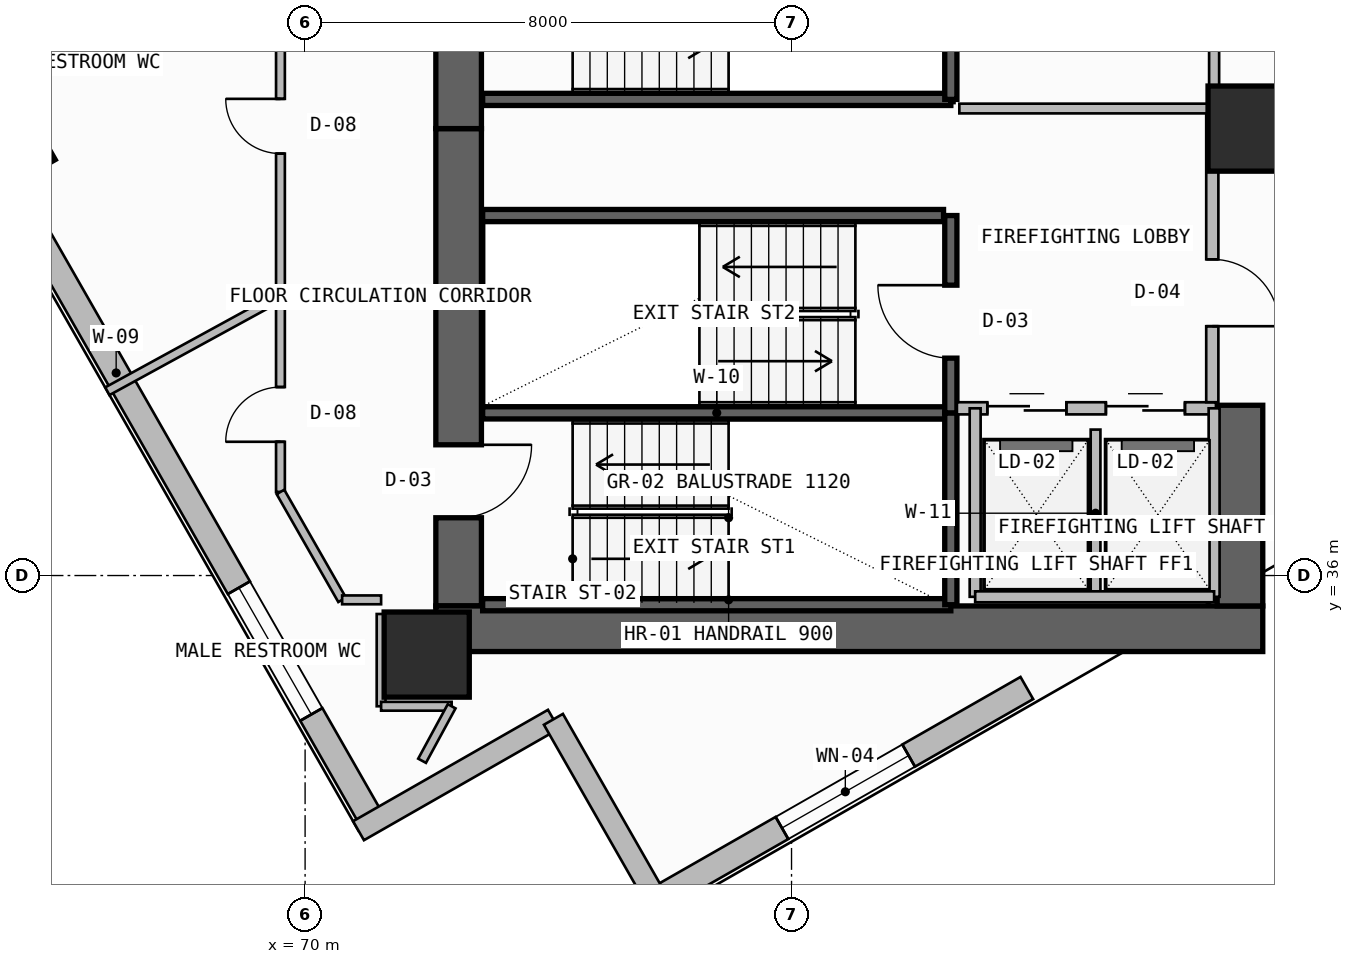
"""IFC4 building model, lengths in metres.
Left out: names, types, materials, properties, quantities, classifications, styles, units other than length and angle.
Written with IfcOpenShell. Run it as: python <this file> out.ifc"""

import sys

from ifc_helpers import new_model, si_unit, direction, frame, frame_2d, origin, origin_2d, place, context, subcontext, project, spatial, rectangle, extrude, element, fill, save


model = new_model("IFC4")
c1 = context("Model", 3, precision=1e-05, world=origin(), true_north=direction((0.0, 1.0)))
c2 = subcontext(c1, "Body", "Model", "MODEL_VIEW")
j1 = project(units=[si_unit("LENGTHUNIT", "METRE"), si_unit("PLANEANGLEUNIT", "RADIAN")], contexts=[c1])
p1 = place(None, origin())
s1 = spatial("IfcSite", under=j1, at=p1, CompositionType="ELEMENT")
p2 = place(p1, origin())
s2 = spatial("IfcBuilding", under=s1, at=p2, CompositionType="ELEMENT")
p3 = place(p2, frame((0.0, 0.0, 222.02)))
s3 = spatial("IfcBuildingStorey", under=s2, at=p3, CompositionType="ELEMENT", Elevation=222.02)
p4 = place(p3, frame((72.525, 35.5, -0.26), z_axis=(0.0, 0.0, 1.0), x_axis=(0.0, 1.0, 0.0)))
e1 = element("IfcWall", 1, at=p4, inside=s3, PredefinedType="SHEAR", context=c2, shape_type="SweptSolid", body=[
    extrude(rectangle(XDim=7.85, YDim=0.75, at=frame_2d((3.925, 0.0))), origin(), (0.0, 0.0, 1.0), 3.52),
])
p5 = place(p4, frame((1.45, 0.0, 0.26)))
e2 = element("IfcOpeningElement", 2, at=p5, cuts=e1, PredefinedType="OPENING", context=c2, shape_type="SweptSolid", body=[
    extrude(rectangle(XDim=1.2, YDim=2.2, at=frame_2d((0.6, 1.1))), frame((0.0, 0.385, 0.0), z_axis=(0.0, -1.0, 0.0), x_axis=(1.0, 0.0, 0.0)), (0.0, 0.0, 1.0), 0.77),
])
p6 = place(p3, frame((72.15, 35.125, -0.26), z_axis=(0.0, 0.0, 1.0), x_axis=(1.0, 0.0, 0.0)))
e3 = element("IfcWall", 3, at=p6, inside=s3, PredefinedType="SHEAR", context=c2, shape_type="SweptSolid", body=[
    extrude(rectangle(XDim=13.6, YDim=0.75, at=frame_2d((6.8, 0.0))), origin(), (0.0, 0.0, 1.0), 3.52),
])
p7 = place(p3, frame((85.375, 35.5, -0.26), z_axis=(0.0, 0.0, 1.0), x_axis=(0.0, 1.0, 0.0)))
e4 = element("IfcWall", 4, at=p7, inside=s3, PredefinedType="SHEAR", context=c2, shape_type="SweptSolid", body=[
    extrude(rectangle(XDim=3.3, YDim=0.75, at=frame_2d((1.65, 0.0))), origin(), (0.0, 0.0, 1.0), 3.52),
])
p8 = place(p3, frame((72.525, 43.35, -0.26), z_axis=(0.0, 0.0, 1.0), x_axis=(0.0, 1.0, 0.0)))
e5 = element("IfcWall", 5, at=p8, inside=s3, PredefinedType="SHEAR", context=c2, shape_type="SweptSolid", body=[
    extrude(rectangle(XDim=12.7, YDim=0.75, at=frame_2d((6.35, 0.0))), origin(), (0.0, 0.0, 1.0), 3.52),
])
p9 = place(p8, frame((1.35, 0.0, 0.26)))
e6 = element("IfcOpeningElement", 6, at=p9, cuts=e5, PredefinedType="OPENING", context=c2, shape_type="SweptSolid", body=[
    extrude(rectangle(XDim=1.2, YDim=2.2, at=frame_2d((0.6, 1.1))), frame((0.0, 0.385, 0.0), z_axis=(0.0, -1.0, 0.0), x_axis=(1.0, 0.0, 0.0)), (0.0, 0.0, 1.0), 0.77),
])
for number, where, z_axis, x_axis in (
    (7, (72.0, 34.7, 0.0), (0.0, 0.0, 1.0), (1.0, 0.0, 0.0)),
    (8, (85.55, 43.35, 0.0), (0.0, 0.0, 1.0), (1.0, 0.0, 0.0)),
):
    element("IfcColumn", number, at=place(p3, frame(where, z_axis=z_axis, x_axis=x_axis)), inside=s3, PredefinedType="COLUMN", context=c2, shape_type="SweptSolid", body=[
        extrude(rectangle(XDim=1.4, YDim=1.4, at=origin_2d()), origin(), (0.0, 0.0, 1.0), 3.52),
    ])
p10 = place(p3, frame((65.173, 43.035, 0.0), z_axis=(0.0, 0.0, 1.0), x_axis=(-0.496216503675, 0.868198814489, 0.0)))
e9 = element("IfcColumn", 9, at=p10, inside=s3, PredefinedType="COLUMN", context=c2, shape_type="SweptSolid", body=[
    extrude(rectangle(XDim=1.05, YDim=1.05, at=origin_2d()), origin(), (0.0, 0.0, 1.0), 3.52),
])
p11 = place(p3, frame((75.779, 30.669, 0.0), z_axis=(0.0, 0.0, 1.0), x_axis=(0.868213158215, 0.496191406519, 0.0)))
e10 = element("IfcWall", 10, at=p11, inside=s3, PredefinedType="SOLIDWALL", context=c2, shape_type="SweptSolid", body=[
    extrude(rectangle(XDim=7.015, YDim=0.42, at=frame_2d((3.508, 0.0))), origin(), (0.0, 0.0, 1.0), 3.26),
])
p12 = place(p11, frame((2.377, 0.0, 1.1)))
e11 = element("IfcOpeningElement", 11, at=p12, cuts=e10, PredefinedType="OPENING", context=c2, shape_type="SweptSolid", body=[
    extrude(rectangle(XDim=2.4, YDim=1.2, at=frame_2d((1.2, 0.6))), frame((0.0, 0.22, 0.0), z_axis=(0.0, -1.0, 0.0), x_axis=(1.0, 0.0, 0.0)), (0.0, 0.0, 1.0), 0.44),
])
p13 = place(p3, frame((64.874, 42.864, 0.0), z_axis=(0.0, 0.0, 1.0), x_axis=(0.49622043329, -0.868196568517, 0.0)))
e12 = element("IfcWall", 12, at=p13, inside=s3, PredefinedType="SOLIDWALL", context=c2, shape_type="SweptSolid", body=[
    extrude(rectangle(XDim=12.582, YDim=0.42, at=frame_2d((6.291, 0.0))), origin(), (0.0, 0.0, 1.0), 2.645),
])
p14 = place(p13, frame((8.136, 0.0, 1.1)))
e13 = element("IfcOpeningElement", 13, at=p14, cuts=e12, PredefinedType="OPENING", context=c2, shape_type="SweptSolid", body=[
    extrude(rectangle(XDim=2.4, YDim=1.2, at=frame_2d((1.2, 0.6))), frame((0.0, 0.22, 0.0), z_axis=(0.0, -1.0, 0.0), x_axis=(1.0, 0.0, 0.0)), (0.0, 0.0, 1.0), 0.44),
])
for number, where, z_axis, x_axis in (
    (14, (70.878, 31.803, 0.0), (0.0, 0.0, 1.0), (0.868, 0.496, 0.0)),
    (15, (74.084, 33.635, 0.0), (0.0, 0.0, 1.0), (0.496, -0.868, 0.0)),
):
    element("IfcWall", number, at=place(p3, frame(where, z_axis=z_axis, x_axis=x_axis)), inside=s3, PredefinedType="SOLIDWALL", context=c2, shape_type="SweptSolid", body=[
        extrude(rectangle(XDim=3.692, YDim=0.36, at=frame_2d((1.846, 0.0))), origin(), (0.0, 0.0, 1.0), 3.26),
    ])
for number, where, z_axis, x_axis in (
    (16, (72.92, 35.52, -0.26), (0.0, 0.0, 1.0), (1.0, 0.0, 0.0)),
    (17, (72.92, 38.675, -0.26), (0.0, 0.0, 1.0), (1.0, 0.0, 0.0)),
):
    element("IfcWall", number, at=place(p3, frame(where, z_axis=z_axis, x_axis=x_axis)), inside=s3, PredefinedType="SOLIDWALL", context=c2, shape_type="SweptSolid", body=[
        extrude(rectangle(XDim=7.7, YDim=0.2, at=frame_2d((3.85, 0.0))), origin(), (0.0, 0.0, 1.0), 3.52),
    ])
p15 = place(p3, frame((80.62, 35.52, -0.26), z_axis=(0.0, 0.0, 1.0), x_axis=(0.0, 1.0, 0.0)))
e18 = element("IfcWall", 18, at=p15, inside=s3, PredefinedType="SOLIDWALL", context=c2, shape_type="SweptSolid", body=[
    extrude(rectangle(XDim=3.155, YDim=0.2, at=frame_2d((1.578, 0.0))), origin(), (0.0, 0.0, 1.0), 3.52),
])
p16 = place(p3, frame((80.62, 38.675, -0.26), z_axis=(0.0, 0.0, 1.0), x_axis=(0.0, 1.0, 0.0)))
e19 = element("IfcWall", 19, at=p16, inside=s3, PredefinedType="SOLIDWALL", context=c2, shape_type="SweptSolid", body=[
    extrude(rectangle(XDim=3.245, YDim=0.2, at=frame_2d((1.623, 0.0))), origin(), (0.0, 0.0, 1.0), 3.52),
])
p17 = place(p16, frame((0.9, 0.0, 0.26)))
e20 = element("IfcOpeningElement", 20, at=p17, cuts=e19, PredefinedType="OPENING", context=c2, shape_type="SweptSolid", body=[
    extrude(rectangle(XDim=1.2, YDim=2.2, at=frame_2d((0.6, 1.1))), frame((0.0, 0.11, 0.0), z_axis=(0.0, -1.0, 0.0), x_axis=(1.0, 0.0, 0.0)), (0.0, 0.0, 1.0), 0.22),
])
p18 = place(p3, frame((80.72, 38.75, 0.0), z_axis=(0.0, 0.0, 1.0), x_axis=(1.0, 0.0, 0.0)))
e21 = element("IfcWall", 21, at=p18, inside=s3, PredefinedType="SOLIDWALL", context=c2, shape_type="SweptSolid", body=[
    extrude(rectangle(XDim=4.26, YDim=0.2, at=frame_2d((2.13, 0.0))), origin(), (0.0, 0.0, 1.0), 3.26),
])
p19 = place(p18, frame((0.5, 0.0, 0.0)))
e22 = element("IfcOpeningElement", 22, at=p19, cuts=e21, PredefinedType="OPENING", context=c2, shape_type="SweptSolid", body=[
    extrude(rectangle(XDim=1.3, YDim=2.3, at=frame_2d((0.65, 1.15))), frame((0.0, 0.11, 0.0), z_axis=(0.0, -1.0, 0.0), x_axis=(1.0, 0.0, 0.0)), (0.0, 0.0, 1.0), 0.22),
])
p20 = place(p18, frame((2.45, 0.0, 0.0)))
e23 = element("IfcOpeningElement", 23, at=p20, cuts=e21, PredefinedType="OPENING", context=c2, shape_type="SweptSolid", body=[
    extrude(rectangle(XDim=1.3, YDim=2.3, at=frame_2d((0.65, 1.15))), frame((0.0, 0.11, 0.0), z_axis=(0.0, -1.0, 0.0), x_axis=(1.0, 0.0, 0.0)), (0.0, 0.0, 1.0), 0.22),
])
p21 = place(p3, frame((83.0, 35.65, 0.0), z_axis=(0.0, 0.0, 1.0), x_axis=(0.0, 1.0, 0.0)))
e24 = element("IfcWall", 24, at=p21, inside=s3, PredefinedType="PLUMBINGWALL", context=c2, shape_type="SweptSolid", body=[
    extrude(rectangle(XDim=2.75, YDim=0.16, at=frame_2d((1.375, 0.0))), origin(), (0.0, 0.0, 1.0), 3.26),
])
for number, where, z_axis, x_axis in (
    (25, (84.95, 35.65, 0.0), (0.0, 0.0, 1.0), (0.0, 1.0, 0.0)),
    (26, (81.02, 35.65, 0.0), (0.0, 0.0, 1.0), (0.0, 1.0, 0.0)),
):
    element("IfcWall", number, at=place(p3, frame(where, z_axis=z_axis, x_axis=x_axis)), inside=s3, PredefinedType="SOLIDWALL", context=c2, shape_type="SweptSolid", body=[
        extrude(rectangle(XDim=3.1, YDim=0.18, at=frame_2d((1.55, 0.0))), origin(), (0.0, 0.0, 1.0), 3.26),
    ])
p22 = place(p3, frame((81.02, 35.65, 0.0), z_axis=(0.0, 0.0, 1.0), x_axis=(1.0, 0.0, 0.0)))
e27 = element("IfcWall", 27, at=p22, inside=s3, PredefinedType="SOLIDWALL", context=c2, shape_type="SweptSolid", body=[
    extrude(rectangle(XDim=3.93, YDim=0.18, at=frame_2d((1.965, 0.0))), origin(), (0.0, 0.0, 1.0), 3.26),
])
p23 = place(p3, frame((84.92, 38.85, 0.0), z_axis=(0.0, 0.0, 1.0), x_axis=(0.0, 1.0, 0.0)))
e28 = element("IfcWall", 28, at=p23, inside=s3, PredefinedType="SOLIDWALL", context=c2, shape_type="SweptSolid", body=[
    extrude(rectangle(XDim=4.83, YDim=0.2, at=frame_2d((2.415, 0.0))), origin(), (0.0, 0.0, 1.0), 3.26),
])
p24 = place(p23, frame((1.25, 0.0, 0.0)))
e29 = element("IfcOpeningElement", 29, at=p24, cuts=e28, PredefinedType="OPENING", context=c2, shape_type="SweptSolid", body=[
    extrude(rectangle(XDim=1.1, YDim=2.2, at=frame_2d((0.55, 1.1))), frame((0.0, 0.11, 0.0), z_axis=(0.0, -1.0, 0.0), x_axis=(1.0, 0.0, 0.0)), (0.0, 0.0, 1.0), 0.22),
])
p25 = place(p3, frame((72.92, 41.92, -0.26), z_axis=(0.0, 0.0, 1.0), x_axis=(1.0, 0.0, 0.0)))
e30 = element("IfcWall", 30, at=p25, inside=s3, PredefinedType="SOLIDWALL", context=c2, shape_type="SweptSolid", body=[
    extrude(rectangle(XDim=7.58, YDim=0.2, at=frame_2d((3.79, 0.0))), origin(), (0.0, 0.0, 1.0), 3.52),
])
p26 = place(p3, frame((72.92, 43.83, -0.26), z_axis=(0.0, 0.0, 1.0), x_axis=(1.0, 0.0, 0.0)))
e31 = element("IfcWall", 31, at=p26, inside=s3, PredefinedType="SOLIDWALL", context=c2, shape_type="SweptSolid", body=[
    extrude(rectangle(XDim=7.7, YDim=0.2, at=frame_2d((3.85, 0.0))), origin(), (0.0, 0.0, 1.0), 3.52),
])
p27 = place(p3, frame((80.62, 43.83, -0.26), z_axis=(0.0, 0.0, 1.0), x_axis=(0.0, 1.0, 0.0)))
e32 = element("IfcWall", 32, at=p27, inside=s3, PredefinedType="SOLIDWALL", context=c2, shape_type="SweptSolid", body=[
    extrude(rectangle(XDim=3.24, YDim=0.2, at=frame_2d((1.62, 0.0))), origin(), (0.0, 0.0, 1.0), 3.52),
])
p28 = place(p3, frame((84.95, 43.68, 0.0), z_axis=(0.0, 0.0, 1.0), x_axis=(0.0, 1.0, 0.0)))
e33 = element("IfcWall", 33, at=p28, inside=s3, PredefinedType="PLUMBINGWALL", context=c2, shape_type="SweptSolid", body=[
    extrude(rectangle(XDim=1.9, YDim=0.165, at=frame_2d((0.95, 0.0))), origin(), (0.0, 0.0, 1.0), 3.26),
])
p29 = place(p3, frame((80.76, 43.68, 0.0), z_axis=(0.0, 0.0, 1.0), x_axis=(1.0, 0.0, 0.0)))
e34 = element("IfcWall", 34, at=p29, inside=s3, PredefinedType="PLUMBINGWALL", context=c2, shape_type="SweptSolid", body=[
    extrude(rectangle(XDim=4.19, YDim=0.16, at=frame_2d((2.095, 0.0))), origin(), (0.0, 0.0, 1.0), 3.26),
])
p30 = place(p3, frame((69.594, 46.222, 0.0), z_axis=(0.0, 0.0, 1.0), x_axis=(0.0, -1.0, 0.0)))
e35 = element("IfcWall", 35, at=p30, inside=s3, PredefinedType="PARTITIONING", context=c2, shape_type="SweptSolid", body=[
    extrude(rectangle(XDim=5.666, YDim=0.145, at=frame_2d((2.833, 0.0))), origin(), (0.0, 0.0, 1.0), 3.26),
])
p31 = place(p30, frame((2.383, 0.0, 0.0)))
e36 = element("IfcOpeningElement", 36, at=p31, cuts=e35, PredefinedType="OPENING", context=c2, shape_type="SweptSolid", body=[
    extrude(rectangle(XDim=0.9, YDim=2.1, at=frame_2d((0.45, 1.05))), frame((0.0, 0.083, 0.0), z_axis=(0.0, -1.0, 0.0), x_axis=(1.0, 0.0, 0.0)), (0.0, 0.0, 1.0), 0.165),
])
p32 = place(p3, frame((69.594, 40.556, 0.0), z_axis=(0.0, 0.0, 1.0), x_axis=(-0.875838256619, -0.482604753647, 0.0)))
e37 = element("IfcWall", 37, at=p32, inside=s3, PredefinedType="PARTITIONING", context=c2, shape_type="SweptSolid", body=[
    extrude(rectangle(XDim=0.068, YDim=0.145, at=frame_2d((0.034, 0.0))), origin(), (0.0, 0.0, 1.0), 3.26),
])
p33 = place(p3, frame((69.521, 40.548, 0.0), z_axis=(0.0, 0.0, 1.0), x_axis=(-0.877304579838, -0.479934031087, 0.0)))
e38 = element("IfcWall", 38, at=p33, inside=s3, PredefinedType="PARTITIONING", context=c2, shape_type="SweptSolid", body=[
    extrude(rectangle(XDim=3.161, YDim=0.145, at=frame_2d((1.581, 0.0))), origin(), (0.0, 0.0, 1.0), 3.26),
])
p34 = place(p3, frame((69.594, 40.459, 0.0), z_axis=(0.0, 0.0, 1.0), x_axis=(0.0, -1.0, 0.0)))
e39 = element("IfcWall", 39, at=p34, inside=s3, PredefinedType="PARTITIONING", context=c2, shape_type="SweptSolid", body=[
    extrude(rectangle(XDim=3.084, YDim=0.145, at=frame_2d((1.542, 0.0))), origin(), (0.0, 0.0, 1.0), 3.26),
])
p35 = place(p34, frame((1.36, 0.0, 0.0)))
e40 = element("IfcOpeningElement", 40, at=p35, cuts=e39, PredefinedType="OPENING", context=c2, shape_type="SweptSolid", body=[
    extrude(rectangle(XDim=0.9, YDim=2.1, at=frame_2d((0.45, 1.05))), frame((0.0, 0.083, 0.0), z_axis=(0.0, -1.0, 0.0), x_axis=(1.0, 0.0, 0.0)), (0.0, 0.0, 1.0), 0.165),
])
p36 = place(p3, frame((69.594, 37.375, 0.0), z_axis=(0.0, 0.0, 1.0), x_axis=(0.496293252846, -0.868154944223, 0.0)))
e41 = element("IfcWall", 41, at=p36, inside=s3, PredefinedType="PARTITIONING", context=c2, shape_type="SweptSolid", body=[
    extrude(rectangle(XDim=2.044, YDim=0.145, at=frame_2d((1.022, 0.0))), origin(), (0.0, 0.0, 1.0), 3.26),
])
p37 = place(p3, frame((70.609, 35.6, 0.0), z_axis=(0.0, 0.0, 1.0), x_axis=(1.0, 0.0, 0.0)))
e42 = element("IfcWall", 42, at=p37, inside=s3, PredefinedType="PARTITIONING", context=c2, shape_type="SweptSolid", body=[
    extrude(rectangle(XDim=0.641, YDim=0.145, at=frame_2d((0.32, 0.0))), origin(), (0.0, 0.0, 1.0), 3.26),
])
p38 = place(p3, frame((71.25, 35.367, 0.0), z_axis=(0.0, 0.0, 1.0), x_axis=(0.0, -1.0, 0.0)))
e43 = element("IfcWall", 43, at=p38, inside=s3, PredefinedType="PARTITIONING", context=c2, shape_type="SweptSolid", body=[
    extrude(rectangle(XDim=1.517, YDim=0.145, at=frame_2d((0.759, 0.0))), origin(), (0.0, 0.0, 1.0), 3.26),
])
p39 = place(p3, frame((71.25, 33.85, 0.0), z_axis=(0.0, 0.0, 1.0), x_axis=(1.0, 0.0, 0.0)))
e44 = element("IfcWall", 44, at=p39, inside=s3, PredefinedType="PARTITIONING", context=c2, shape_type="SweptSolid", body=[
    extrude(rectangle(XDim=1.16, YDim=0.145, at=frame_2d((0.58, 0.0))), origin(), (0.0, 0.0, 1.0), 3.26),
])
p40 = place(p3, frame((72.41, 33.85, 0.0), z_axis=(0.0, 0.0, 1.0), x_axis=(-0.476938628397, -0.878936598818, 0.0)))
e45 = element("IfcWall", 45, at=p40, inside=s3, PredefinedType="PARTITIONING", context=c2, shape_type="SweptSolid", body=[
    extrude(rectangle(XDim=1.02, YDim=0.145, at=frame_2d((0.51, 0.0))), origin(), (0.0, 0.0, 1.0), 3.26),
])
p41 = place(p12, origin())
e46 = element("IfcWindow", 46, at=p41, inside=s3, PartitioningType="SINGLE_PANEL", PredefinedType="WINDOW", context=c2, shape_type="SweptSolid", body=[
    extrude(rectangle(XDim=2.4, YDim=1.2, at=frame_2d((1.2, 0.6))), frame((0.0, 0.03, 0.0), z_axis=(0.0, -1.0, 0.0), x_axis=(1.0, 0.0, 0.0)), (0.0, 0.0, 1.0), 0.06),
])
fill(e11, e46)
p42 = place(p14, origin())
e47 = element("IfcWindow", 47, at=p42, inside=s3, PartitioningType="SINGLE_PANEL", PredefinedType="WINDOW", context=c2, shape_type="SweptSolid", body=[
    extrude(rectangle(XDim=2.4, YDim=1.2, at=frame_2d((1.2, 0.6))), frame((0.0, 0.03, 0.0), z_axis=(0.0, -1.0, 0.0), x_axis=(1.0, 0.0, 0.0)), (0.0, 0.0, 1.0), 0.06),
])
fill(e13, e47)
p43 = place(p5, frame((1.2, 0.0, 0.0), z_axis=(0.0, 0.0, 1.0), x_axis=(-1.0, 0.0, 0.0)))
e48 = element("IfcDoor", 48, at=p43, inside=s3, OperationType="SINGLE_SWING_LEFT", PredefinedType="USERDEFINED", context=c2, shape_type="SweptSolid", body=[
    extrude(rectangle(XDim=1.2, YDim=2.2, at=frame_2d((0.6, 1.1))), frame((0.0, 0.025, 0.0), z_axis=(0.0, -1.0, 0.0), x_axis=(1.0, 0.0, 0.0)), (0.0, 0.0, 1.0), 0.05),
])
fill(e2, e48)
p44 = place(p17, origin())
e49 = element("IfcDoor", 49, at=p44, inside=s3, OperationType="SINGLE_SWING_RIGHT", PredefinedType="USERDEFINED", context=c2, shape_type="SweptSolid", body=[
    extrude(rectangle(XDim=1.2, YDim=2.2, at=frame_2d((0.6, 1.1))), frame((0.0, 0.025, 0.0), z_axis=(0.0, -1.0, 0.0), x_axis=(1.0, 0.0, 0.0)), (0.0, 0.0, 1.0), 0.05),
])
fill(e20, e49)
p45 = place(p19, origin())
e50 = element("IfcDoor", 50, at=p45, inside=s3, OperationType="DOUBLE_DOOR_SLIDING", PredefinedType="DOOR", context=c2, shape_type="SweptSolid", body=[
    extrude(rectangle(XDim=1.3, YDim=2.3, at=frame_2d((0.65, 1.15))), frame((0.0, 0.025, 0.0), z_axis=(0.0, -1.0, 0.0), x_axis=(1.0, 0.0, 0.0)), (0.0, 0.0, 1.0), 0.05),
])
fill(e22, e50)
p46 = place(p20, origin())
e51 = element("IfcDoor", 51, at=p46, inside=s3, OperationType="DOUBLE_DOOR_SLIDING", PredefinedType="DOOR", context=c2, shape_type="SweptSolid", body=[
    extrude(rectangle(XDim=1.3, YDim=2.3, at=frame_2d((0.65, 1.15))), frame((0.0, 0.025, 0.0), z_axis=(0.0, -1.0, 0.0), x_axis=(1.0, 0.0, 0.0)), (0.0, 0.0, 1.0), 0.05),
])
fill(e23, e51)
p47 = place(p24, frame((1.1, 0.0, 0.0), z_axis=(0.0, 0.0, 1.0), x_axis=(-1.0, 0.0, 0.0)))
e52 = element("IfcDoor", 52, at=p47, inside=s3, OperationType="SINGLE_SWING_RIGHT", PredefinedType="DOOR", context=c2, shape_type="SweptSolid", body=[
    extrude(rectangle(XDim=1.1, YDim=2.2, at=frame_2d((0.55, 1.1))), frame((0.0, 0.025, 0.0), z_axis=(0.0, -1.0, 0.0), x_axis=(1.0, 0.0, 0.0)), (0.0, 0.0, 1.0), 0.05),
])
fill(e29, e52)
p48 = place(p31, frame((0.9, 0.0, 0.0), z_axis=(0.0, 0.0, 1.0), x_axis=(-1.0, 0.0, 0.0)))
e53 = element("IfcDoor", 53, at=p48, inside=s3, OperationType="SINGLE_SWING_RIGHT", PredefinedType="DOOR", context=c2, shape_type="SweptSolid", body=[
    extrude(rectangle(XDim=0.9, YDim=2.1, at=frame_2d((0.45, 1.05))), frame((0.0, 0.025, 0.0), z_axis=(0.0, -1.0, 0.0), x_axis=(1.0, 0.0, 0.0)), (0.0, 0.0, 1.0), 0.05),
])
fill(e36, e53)
p49 = place(p35, frame((0.9, 0.0, 0.0), z_axis=(0.0, 0.0, 1.0), x_axis=(-1.0, 0.0, 0.0)))
e54 = element("IfcDoor", 54, at=p49, inside=s3, OperationType="SINGLE_SWING_LEFT", PredefinedType="DOOR", context=c2, shape_type="SweptSolid", body=[
    extrude(rectangle(XDim=0.9, YDim=2.1, at=frame_2d((0.45, 1.05))), frame((0.0, 0.025, 0.0), z_axis=(0.0, -1.0, 0.0), x_axis=(1.0, 0.0, 0.0)), (0.0, 0.0, 1.0), 0.05),
])
fill(e40, e54)
save(model, sys.argv[1])
